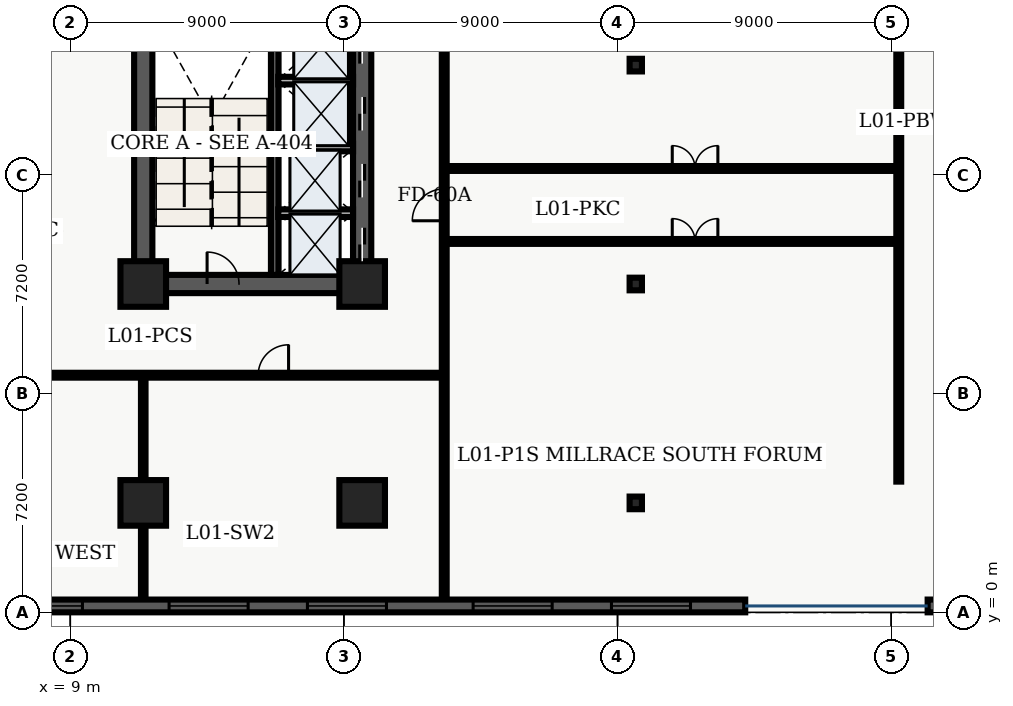
"""IFC4 building model, lengths in metres.
Left out: names, types, materials, properties, quantities, classifications, styles, units other than length and angle.
Written with IfcOpenShell. Run it as: python <this file> out.ifc"""

import sys

from ifc_helpers import new_model, entity, si_unit, converted_unit, direction, frame, origin_with_axes, origin_2d_with_axis, place, context, subcontext, project, spatial, polyline, rectangle, i_section, outline, extrude, element, fill, save


model = new_model("IFC4")
c1 = context("Model", 3, precision=1e-05, world=origin_with_axes(), true_north=direction((0.0, 1.0)))
c2 = subcontext(c1, "Body", "Model", "MODEL_VIEW")
j1 = project(units=[si_unit("LENGTHUNIT", "METRE"), converted_unit("PLANEANGLEUNIT", "DEGREE", entity("IfcPlaneAngleMeasure", 0.017), si_unit("PLANEANGLEUNIT", "RADIAN"), dimensions=[0, 0, 0, 0, 0, 0, 0])], contexts=[c1])
p1 = place(None, origin_with_axes())
s1 = spatial("IfcSite", under=j1, at=p1, CompositionType="ELEMENT")
p2 = place(p1, origin_with_axes())
s2 = spatial("IfcBuilding", under=s1, at=p2, CompositionType="ELEMENT")
p3 = place(p2, frame((0.0, 0.0, 5.7), z_axis=(0.0, 0.0, 1.0), x_axis=(1.0, 0.0, 0.0)))
s3 = spatial("IfcBuildingStorey", under=s2, at=p3, CompositionType="ELEMENT", Elevation=5.7)
p4 = place(p3, frame((11.4, 10.8, 0.0), z_axis=(0.0, 0.0, 1.0), x_axis=(0.0, 1.0, 0.0)))
e1 = element("IfcWall", 1, at=p4, inside=s3, PredefinedType="SHEAR", context=c2, shape_type="SweptSolid", body=[
    extrude(outline(polyline([(0.0, -0.3), (27.0, -0.3), (27.0, 0.3), (0.0, 0.3), (0.0, -0.3)])), origin_with_axes(), (0.0, 0.0, 1.0), 4.86),
])
p5 = place(p3, frame((11.4, 10.8, 0.0), z_axis=(0.0, 0.0, 1.0), x_axis=(1.0, 0.0, 0.0)))
e2 = element("IfcWall", 2, at=p5, inside=s3, PredefinedType="SHEAR", context=c2, shape_type="SweptSolid", body=[
    extrude(outline(polyline([(0.0, -0.3), (7.2, -0.3), (7.2, 0.3), (0.0, 0.3), (0.0, -0.3)])), origin_with_axes(), (0.0, 0.0, 1.0), 4.86),
])
p6 = place(p5, frame((2.625, 0.0, 0.0), z_axis=(0.0, 0.0, 1.0), x_axis=(1.0, 0.0, 0.0)))
e3 = element("IfcOpeningElement", 3, at=p6, cuts=e2, PredefinedType="OPENING", context=c2, shape_type="SweptSolid", body=[
    extrude(rectangle(XDim=1.05, YDim=0.62, at=origin_2d_with_axis()), origin_with_axes(), (0.0, 0.0, 1.0), 2.15),
])
p7 = place(p3, frame((18.6, 10.8, 0.0), z_axis=(0.0, 0.0, 1.0), x_axis=(0.0, 1.0, 0.0)))
e4 = element("IfcWall", 4, at=p7, inside=s3, PredefinedType="SHEAR", context=c2, shape_type="SweptSolid", body=[
    extrude(outline(polyline([(0.0, -0.3), (13.5, -0.3), (13.5, 0.3), (0.0, 0.3), (0.0, -0.3)])), origin_with_axes(), (0.0, 0.0, 1.0), 4.86),
])
p8 = place(p7, frame((1.3, 0.0, 0.0), z_axis=(0.0, 0.0, 1.0), x_axis=(1.0, 0.0, 0.0)))
e5 = element("IfcOpeningElement", 5, at=p8, cuts=e4, PredefinedType="OPENING", context=c2, shape_type="SweptSolid", body=[
    extrude(rectangle(XDim=1.1, YDim=0.62, at=origin_2d_with_axis()), origin_with_axes(), (0.0, 0.0, 1.0), 2.15),
])
p9 = place(p7, frame((3.4, 0.0, 0.0), z_axis=(0.0, 0.0, 1.0), x_axis=(1.0, 0.0, 0.0)))
e6 = element("IfcOpeningElement", 6, at=p9, cuts=e4, PredefinedType="OPENING", context=c2, shape_type="SweptSolid", body=[
    extrude(rectangle(XDim=1.1, YDim=0.62, at=origin_2d_with_axis()), origin_with_axes(), (0.0, 0.0, 1.0), 2.15),
])
p10 = place(p7, frame((5.6, 0.0, 0.0), z_axis=(0.0, 0.0, 1.0), x_axis=(1.0, 0.0, 0.0)))
e7 = element("IfcOpeningElement", 7, at=p10, cuts=e4, PredefinedType="OPENING", context=c2, shape_type="SweptSolid", body=[
    extrude(rectangle(XDim=1.1, YDim=0.62, at=origin_2d_with_axis()), origin_with_axes(), (0.0, 0.0, 1.0), 2.15),
])
p11 = place(p7, frame((7.8, 0.0, 0.0), z_axis=(0.0, 0.0, 1.0), x_axis=(1.0, 0.0, 0.0)))
e8 = element("IfcOpeningElement", 8, at=p11, cuts=e4, PredefinedType="OPENING", context=c2, shape_type="SweptSolid", body=[
    extrude(rectangle(XDim=1.1, YDim=0.62, at=origin_2d_with_axis()), origin_with_axes(), (0.0, 0.0, 1.0), 2.15),
])
p12 = place(p7, frame((11.125, 0.0, 0.0), z_axis=(0.0, 0.0, 1.0), x_axis=(1.0, 0.0, 0.0)))
e9 = element("IfcOpeningElement", 9, at=p12, cuts=e4, PredefinedType="OPENING", context=c2, shape_type="SweptSolid", body=[
    extrude(rectangle(XDim=1.05, YDim=0.62, at=origin_2d_with_axis()), origin_with_axes(), (0.0, 0.0, 1.0), 2.15),
])
p13 = place(p3, frame((15.725, 11.1, 0.0), z_axis=(0.0, 0.0, 1.0), x_axis=(0.0, 1.0, 0.0)))
e10 = element("IfcWall", 10, at=p13, inside=s3, PredefinedType="SHEAR", context=c2, shape_type="SweptSolid", body=[
    extrude(outline(polyline([(0.0, -0.125), (8.6, -0.125), (8.6, 0.125), (0.0, 0.125), (0.0, -0.125)])), origin_with_axes(), (0.0, 0.0, 1.0), 4.86),
])
for number, where, z_axis, x_axis in (
    (11, (11.4, 3.6, 0.0), (0.0, 0.0, 1.0), (1.0, 0.0, 0.0)),
    (12, (11.4, 10.8, 0.0), (0.0, 0.0, 1.0), (1.0, 0.0, 0.0)),
    (13, (18.6, 3.6, 0.0), (0.0, 0.0, 1.0), (1.0, 0.0, 0.0)),
    (14, (18.6, 10.8, 0.0), (0.0, 0.0, 1.0), (1.0, 0.0, 0.0)),
):
    element("IfcColumn", number, at=place(p3, frame(where, z_axis=z_axis, x_axis=x_axis)), inside=s3, PredefinedType="COLUMN", context=c2, shape_type="SweptSolid", body=[
        extrude(rectangle(XDim=1.5, YDim=1.5, at=origin_2d_with_axis()), origin_with_axes(), (0.0, 0.0, 1.0), 5.1),
    ])
for number, where, z_axis, x_axis in (
    (15, (27.6, 3.6, 0.0), (0.0, 0.0, 1.0), (1.0, 0.0, 0.0)),
    (16, (27.6, 10.8, 0.0), (0.0, 0.0, 1.0), (1.0, 0.0, 0.0)),
    (17, (27.6, 18.0, 0.0), (0.0, 0.0, 1.0), (1.0, 0.0, 0.0)),
):
    element("IfcColumn", number, at=place(p3, frame(where, z_axis=z_axis, x_axis=x_axis)), inside=s3, PredefinedType="COLUMN", context=c2, shape_type="SweptSolid", body=[
        extrude(i_section(OverallWidth=0.406, OverallDepth=0.416, WebThickness=0.03, FlangeThickness=0.048, FilletRadius=0.022, at=origin_2d_with_axis()), origin_with_axes(), (0.0, 0.0, 1.0), 5.1),
    ])
for number, where, z_axis, x_axis in (
    (18, (15.84, 13.13, 0.0), (0.0, 0.0, 1.0), (1.0, 0.0, 0.0)),
    (19, (15.84, 15.29, 0.0), (0.0, 0.0, 1.0), (1.0, 0.0, 0.0)),
    (20, (15.84, 17.49, 0.0), (0.0, 0.0, 1.0), (1.0, 0.0, 0.0)),
):
    element("IfcWall", number, at=place(p3, frame(where, z_axis=z_axis, x_axis=x_axis)), inside=s3, PredefinedType="SOLIDWALL", context=c2, shape_type="SweptSolid", body=[
        extrude(outline(polyline([(0.0, -0.125), (2.46, -0.125), (2.46, 0.125), (0.0, 0.125), (0.0, -0.125)])), origin_with_axes(), (0.0, 0.0, 1.0), 3.2),
    ])
p14 = place(p3, frame((0.38, 7.8, 0.0), z_axis=(0.0, 0.0, 1.0), x_axis=(1.0, 0.0, 0.0)))
e21 = element("IfcWall", 21, at=p14, inside=s3, PredefinedType="PARTITIONING", context=c2, shape_type="SweptSolid", body=[
    extrude(outline(polyline([(0.0, -0.08), (20.92, -0.08), (20.92, 0.08), (0.0, 0.08), (0.0, -0.08)])), origin_with_axes(), (0.0, 0.0, 1.0), 3.2),
])
p15 = place(p14, frame((3.7, 0.0, 0.0), z_axis=(0.0, 0.0, 1.0), x_axis=(1.0, 0.0, 0.0)))
e22 = element("IfcOpeningElement", 22, at=p15, cuts=e21, PredefinedType="OPENING", context=c2, shape_type="SweptSolid", body=[
    extrude(rectangle(XDim=1.0, YDim=0.18, at=origin_2d_with_axis()), origin_with_axes(), (0.0, 0.0, 1.0), 2.15),
])
p16 = place(p14, frame((15.3, 0.0, 0.0), z_axis=(0.0, 0.0, 1.0), x_axis=(1.0, 0.0, 0.0)))
e23 = element("IfcOpeningElement", 23, at=p16, cuts=e21, PredefinedType="OPENING", context=c2, shape_type="SweptSolid", body=[
    extrude(rectangle(XDim=1.0, YDim=0.18, at=origin_2d_with_axis()), origin_with_axes(), (0.0, 0.0, 1.0), 2.15),
])
p17 = place(p3, frame((11.4, 0.38, 0.0), z_axis=(0.0, 0.0, 1.0), x_axis=(0.0, 1.0, 0.0)))
e24 = element("IfcWall", 24, at=p17, inside=s3, PredefinedType="PARTITIONING", context=c2, shape_type="SweptSolid", body=[
    extrude(outline(polyline([(0.0, -0.075), (7.42, -0.075), (7.42, 0.075), (0.0, 0.075), (0.0, -0.075)])), origin_with_axes(), (0.0, 0.0, 1.0), 3.2),
])
p18 = place(p3, frame((21.3, 0.38, 0.0), z_axis=(0.0, 0.0, 1.0), x_axis=(0.0, 1.0, 0.0)))
e25 = element("IfcWall", 25, at=p18, inside=s3, PredefinedType="PARTITIONING", context=c2, shape_type="SweptSolid", body=[
    extrude(outline(polyline([(0.0, -0.08), (38.84, -0.08), (38.84, 0.08), (0.0, 0.08), (0.0, -0.08)])), origin_with_axes(), (0.0, 0.0, 1.0), 3.2),
])
p19 = place(p18, frame((13.025, 0.0, 0.0), z_axis=(0.0, 0.0, 1.0), x_axis=(1.0, 0.0, 0.0)))
e26 = element("IfcOpeningElement", 26, at=p19, cuts=e25, PredefinedType="OPENING", context=c2, shape_type="SweptSolid", body=[
    extrude(rectangle(XDim=1.05, YDim=0.18, at=origin_2d_with_axis()), origin_with_axes(), (0.0, 0.0, 1.0), 2.15),
])
p20 = place(p18, frame((31.25, 0.0, 0.0), z_axis=(0.0, 0.0, 1.0), x_axis=(1.0, 0.0, 0.0)))
e27 = element("IfcOpeningElement", 27, at=p20, cuts=e25, PredefinedType="OPENING", context=c2, shape_type="SweptSolid", body=[
    extrude(rectangle(XDim=1.5, YDim=0.18, at=origin_2d_with_axis()), origin_with_axes(), (0.0, 0.0, 1.0), 2.2),
])
p21 = place(p3, frame((21.3, 12.2, 0.0), z_axis=(0.0, 0.0, 1.0), x_axis=(1.0, 0.0, 0.0)))
e28 = element("IfcWall", 28, at=p21, inside=s3, PredefinedType="PARTITIONING", context=c2, shape_type="SweptSolid", body=[
    extrude(outline(polyline([(0.0, -0.08), (14.95, -0.08), (14.95, 0.08), (0.0, 0.08), (0.0, -0.08)])), origin_with_axes(), (0.0, 0.0, 1.0), 3.2),
])
p22 = place(p21, frame((8.25, 0.0, 0.0), z_axis=(0.0, 0.0, 1.0), x_axis=(1.0, 0.0, 0.0)))
e29 = element("IfcOpeningElement", 29, at=p22, cuts=e28, PredefinedType="OPENING", context=c2, shape_type="SweptSolid", body=[
    extrude(rectangle(XDim=1.5, YDim=0.18, at=origin_2d_with_axis()), origin_with_axes(), (0.0, 0.0, 1.0), 2.2),
])
p23 = place(p3, frame((21.3, 14.6, 0.0), z_axis=(0.0, 0.0, 1.0), x_axis=(1.0, 0.0, 0.0)))
e30 = element("IfcWall", 30, at=p23, inside=s3, PredefinedType="PARTITIONING", context=c2, shape_type="SweptSolid", body=[
    extrude(outline(polyline([(0.0, -0.08), (14.95, -0.08), (14.95, 0.08), (0.0, 0.08), (0.0, -0.08)])), origin_with_axes(), (0.0, 0.0, 1.0), 3.2),
])
p24 = place(p23, frame((8.25, 0.0, 0.0), z_axis=(0.0, 0.0, 1.0), x_axis=(1.0, 0.0, 0.0)))
e31 = element("IfcOpeningElement", 31, at=p24, cuts=e30, PredefinedType="OPENING", context=c2, shape_type="SweptSolid", body=[
    extrude(rectangle(XDim=1.5, YDim=0.18, at=origin_2d_with_axis()), origin_with_axes(), (0.0, 0.0, 1.0), 2.2),
])
p25 = place(p3, frame((36.25, 4.3, 0.0), z_axis=(0.0, 0.0, 1.0), x_axis=(0.0, 1.0, 0.0)))
e32 = element("IfcWall", 32, at=p25, inside=s3, PredefinedType="PARTITIONING", context=c2, shape_type="SweptSolid", body=[
    extrude(outline(polyline([(0.0, -0.08), (22.5, -0.08), (22.5, 0.08), (0.0, 0.08), (0.0, -0.08)])), origin_with_axes(), (0.0, 0.0, 1.0), 3.2),
])
p26 = place(p3, frame((67.98, 0.21, 0.0), z_axis=(0.0, 0.0, 1.0), x_axis=(-1.0, 0.0, 0.0)))
e33 = element("IfcWall", 33, at=p26, inside=s3, PredefinedType="SOLIDWALL", context=c2, shape_type="SweptSolid", body=[
    extrude(outline(polyline([(0.0, -0.21), (30.78, -0.21), (30.78, 0.21), (0.0, 0.21), (0.0, -0.21)])), origin_with_axes(), (0.0, 0.0, 1.0), 4.86),
])
p27 = place(p26, frame((3.065, 0.0, 0.45), z_axis=(0.0, 0.0, 1.0), x_axis=(1.0, 0.0, 0.0)))
e34 = element("IfcOpeningElement", 34, at=p27, cuts=e33, PredefinedType="OPENING", context=c2, shape_type="SweptSolid", body=[
    extrude(rectangle(XDim=2.6, YDim=0.44, at=origin_2d_with_axis()), origin_with_axes(), (0.0, 0.0, 1.0), 2.8),
])
p28 = place(p26, frame((7.995, 0.0, 0.45), z_axis=(0.0, 0.0, 1.0), x_axis=(1.0, 0.0, 0.0)))
e35 = element("IfcOpeningElement", 35, at=p28, cuts=e33, PredefinedType="OPENING", context=c2, shape_type="SweptSolid", body=[
    extrude(rectangle(XDim=2.6, YDim=0.44, at=origin_2d_with_axis()), origin_with_axes(), (0.0, 0.0, 1.0), 2.8),
])
p29 = place(p26, frame((12.925, 0.0, 0.45), z_axis=(0.0, 0.0, 1.0), x_axis=(1.0, 0.0, 0.0)))
e36 = element("IfcOpeningElement", 36, at=p29, cuts=e33, PredefinedType="OPENING", context=c2, shape_type="SweptSolid", body=[
    extrude(rectangle(XDim=2.6, YDim=0.44, at=origin_2d_with_axis()), origin_with_axes(), (0.0, 0.0, 1.0), 2.8),
])
p30 = place(p26, frame((22.785, 0.0, 0.45), z_axis=(0.0, 0.0, 1.0), x_axis=(1.0, 0.0, 0.0)))
e37 = element("IfcOpeningElement", 37, at=p30, cuts=e33, PredefinedType="OPENING", context=c2, shape_type="SweptSolid", body=[
    extrude(rectangle(XDim=2.6, YDim=0.44, at=origin_2d_with_axis()), origin_with_axes(), (0.0, 0.0, 1.0), 2.8),
])
p31 = place(p26, frame((27.715, 0.0, 0.45), z_axis=(0.0, 0.0, 1.0), x_axis=(1.0, 0.0, 0.0)))
e38 = element("IfcOpeningElement", 38, at=p31, cuts=e33, PredefinedType="OPENING", context=c2, shape_type="SweptSolid", body=[
    extrude(rectangle(XDim=2.6, YDim=0.44, at=origin_2d_with_axis()), origin_with_axes(), (0.0, 0.0, 1.0), 2.8),
])
p32 = place(p3, frame((31.2, 0.21, 0.0), z_axis=(0.0, 0.0, 1.0), x_axis=(-1.0, 0.0, 0.0)))
e39 = element("IfcWall", 39, at=p32, inside=s3, PredefinedType="SOLIDWALL", context=c2, shape_type="SweptSolid", body=[
    extrude(outline(polyline([(0.0, -0.21), (31.2, -0.21), (31.2, 0.21), (0.0, 0.21), (0.0, -0.21)])), origin_with_axes(), (0.0, 0.0, 1.0), 4.86),
])
p33 = place(p32, frame((3.1, 0.0, 0.45), z_axis=(0.0, 0.0, 1.0), x_axis=(1.0, 0.0, 0.0)))
e40 = element("IfcOpeningElement", 40, at=p33, cuts=e39, PredefinedType="OPENING", context=c2, shape_type="SweptSolid", body=[
    extrude(rectangle(XDim=2.6, YDim=0.44, at=origin_2d_with_axis()), origin_with_axes(), (0.0, 0.0, 1.0), 2.8),
])
p34 = place(p32, frame((7.65, 0.0, 0.45), z_axis=(0.0, 0.0, 1.0), x_axis=(1.0, 0.0, 0.0)))
e41 = element("IfcOpeningElement", 41, at=p34, cuts=e39, PredefinedType="OPENING", context=c2, shape_type="SweptSolid", body=[
    extrude(rectangle(XDim=2.6, YDim=0.44, at=origin_2d_with_axis()), origin_with_axes(), (0.0, 0.0, 1.0), 2.8),
])
p35 = place(p32, frame((13.1, 0.0, 0.45), z_axis=(0.0, 0.0, 1.0), x_axis=(1.0, 0.0, 0.0)))
e42 = element("IfcOpeningElement", 42, at=p35, cuts=e39, PredefinedType="OPENING", context=c2, shape_type="SweptSolid", body=[
    extrude(rectangle(XDim=2.6, YDim=0.44, at=origin_2d_with_axis()), origin_with_axes(), (0.0, 0.0, 1.0), 2.8),
])
p36 = place(p32, frame((17.65, 0.0, 0.45), z_axis=(0.0, 0.0, 1.0), x_axis=(1.0, 0.0, 0.0)))
e43 = element("IfcOpeningElement", 43, at=p36, cuts=e39, PredefinedType="OPENING", context=c2, shape_type="SweptSolid", body=[
    extrude(rectangle(XDim=2.6, YDim=0.44, at=origin_2d_with_axis()), origin_with_axes(), (0.0, 0.0, 1.0), 2.8),
])
p37 = place(p32, frame((23.1, 0.0, 0.45), z_axis=(0.0, 0.0, 1.0), x_axis=(1.0, 0.0, 0.0)))
e44 = element("IfcOpeningElement", 44, at=p37, cuts=e39, PredefinedType="OPENING", context=c2, shape_type="SweptSolid", body=[
    extrude(rectangle(XDim=2.6, YDim=0.44, at=origin_2d_with_axis()), origin_with_axes(), (0.0, 0.0, 1.0), 2.8),
])
p38 = place(p32, frame((28.1, 0.0, 0.45), z_axis=(0.0, 0.0, 1.0), x_axis=(1.0, 0.0, 0.0)))
e45 = element("IfcOpeningElement", 45, at=p38, cuts=e39, PredefinedType="OPENING", context=c2, shape_type="SweptSolid", body=[
    extrude(rectangle(XDim=2.6, YDim=0.44, at=origin_2d_with_axis()), origin_with_axes(), (0.0, 0.0, 1.0), 2.8),
])
p39 = place(p7, frame((1.3, 0.0, 0.0), z_axis=(0.0, 0.0, 1.0), x_axis=(1.0, 0.0, 0.0)))
e46 = element("IfcDoor", 46, at=p39, inside=s3, OperationType="SLIDING_TO_LEFT", PredefinedType="DOOR", context=c2, shape_type="SweptSolid", body=[
    extrude(rectangle(XDim=1.1, YDim=0.09, at=origin_2d_with_axis()), origin_with_axes(), (0.0, 0.0, 1.0), 2.15),
])
fill(e5, e46)
p40 = place(p7, frame((3.4, 0.0, 0.0), z_axis=(0.0, 0.0, 1.0), x_axis=(1.0, 0.0, 0.0)))
e47 = element("IfcDoor", 47, at=p40, inside=s3, OperationType="SLIDING_TO_RIGHT", PredefinedType="DOOR", context=c2, shape_type="SweptSolid", body=[
    extrude(rectangle(XDim=1.1, YDim=0.09, at=origin_2d_with_axis()), origin_with_axes(), (0.0, 0.0, 1.0), 2.15),
])
fill(e6, e47)
p41 = place(p7, frame((5.6, 0.0, 0.0), z_axis=(0.0, 0.0, 1.0), x_axis=(1.0, 0.0, 0.0)))
e48 = element("IfcDoor", 48, at=p41, inside=s3, OperationType="DOUBLE_DOOR_SLIDING", PredefinedType="DOOR", context=c2, shape_type="SweptSolid", body=[
    extrude(rectangle(XDim=1.1, YDim=0.09, at=origin_2d_with_axis()), origin_with_axes(), (0.0, 0.0, 1.0), 2.15),
])
fill(e7, e48)
p42 = place(p7, frame((7.8, 0.0, 0.0), z_axis=(0.0, 0.0, 1.0), x_axis=(1.0, 0.0, 0.0)))
e49 = element("IfcDoor", 49, at=p42, inside=s3, OperationType="DOUBLE_DOOR_SLIDING", PredefinedType="DOOR", context=c2, shape_type="SweptSolid", body=[
    extrude(rectangle(XDim=1.1, YDim=0.09, at=origin_2d_with_axis()), origin_with_axes(), (0.0, 0.0, 1.0), 2.15),
])
fill(e8, e49)
p43 = place(p5, frame((2.625, 0.0, 0.0), z_axis=(0.0, 0.0, 1.0), x_axis=(1.0, 0.0, 0.0)))
e50 = element("IfcDoor", 50, at=p43, inside=s3, OperationType="SINGLE_SWING_LEFT", PredefinedType="DOOR", context=c2, shape_type="SweptSolid", body=[
    extrude(rectangle(XDim=1.05, YDim=0.09, at=origin_2d_with_axis()), origin_with_axes(), (0.0, 0.0, 1.0), 2.15),
])
fill(e3, e50)
p44 = place(p18, frame((13.025, 0.0, 0.0), z_axis=(0.0, 0.0, 1.0), x_axis=(1.0, 0.0, 0.0)))
e51 = element("IfcDoor", 51, at=p44, inside=s3, OperationType="SINGLE_SWING_LEFT", PredefinedType="DOOR", context=c2, shape_type="SweptSolid", body=[
    extrude(rectangle(XDim=1.05, YDim=0.09, at=origin_2d_with_axis()), origin_with_axes(), (0.0, 0.0, 1.0), 2.15),
])
fill(e26, e51)
p45 = place(p14, frame((15.3, 0.0, 0.0), z_axis=(0.0, 0.0, 1.0), x_axis=(1.0, 0.0, 0.0)))
e52 = element("IfcDoor", 52, at=p45, inside=s3, OperationType="SINGLE_SWING_RIGHT", PredefinedType="DOOR", context=c2, shape_type="SweptSolid", body=[
    extrude(rectangle(XDim=1.0, YDim=0.09, at=origin_2d_with_axis()), origin_with_axes(), (0.0, 0.0, 1.0), 2.15),
])
fill(e23, e52)
p46 = place(p21, frame((8.25, 0.0, 0.0), z_axis=(0.0, 0.0, 1.0), x_axis=(1.0, 0.0, 0.0)))
e53 = element("IfcDoor", 53, at=p46, inside=s3, OperationType="DOUBLE_DOOR_SINGLE_SWING", PredefinedType="DOOR", context=c2, shape_type="SweptSolid", body=[
    extrude(rectangle(XDim=1.5, YDim=0.09, at=origin_2d_with_axis()), origin_with_axes(), (0.0, 0.0, 1.0), 2.2),
])
fill(e29, e53)
p47 = place(p23, frame((8.25, 0.0, 0.0), z_axis=(0.0, 0.0, 1.0), x_axis=(1.0, 0.0, 0.0)))
e54 = element("IfcDoor", 54, at=p47, inside=s3, OperationType="DOUBLE_DOOR_SINGLE_SWING", PredefinedType="DOOR", context=c2, shape_type="SweptSolid", body=[
    extrude(rectangle(XDim=1.5, YDim=0.09, at=origin_2d_with_axis()), origin_with_axes(), (0.0, 0.0, 1.0), 2.2),
])
fill(e31, e54)
p48 = place(p32, frame((3.1, 0.0, 0.45), z_axis=(0.0, 0.0, 1.0), x_axis=(1.0, 0.0, 0.0)))
e55 = element("IfcWindow", 55, at=p48, inside=s3, PredefinedType="WINDOW", context=c2, shape_type="SweptSolid", body=[
    extrude(rectangle(XDim=2.6, YDim=0.09, at=origin_2d_with_axis()), origin_with_axes(), (0.0, 0.0, 1.0), 2.8),
])
fill(e40, e55)
p49 = place(p32, frame((7.65, 0.0, 0.45), z_axis=(0.0, 0.0, 1.0), x_axis=(1.0, 0.0, 0.0)))
e56 = element("IfcWindow", 56, at=p49, inside=s3, PredefinedType="WINDOW", context=c2, shape_type="SweptSolid", body=[
    extrude(rectangle(XDim=2.6, YDim=0.09, at=origin_2d_with_axis()), origin_with_axes(), (0.0, 0.0, 1.0), 2.8),
])
fill(e41, e56)
p50 = place(p32, frame((13.1, 0.0, 0.45), z_axis=(0.0, 0.0, 1.0), x_axis=(1.0, 0.0, 0.0)))
e57 = element("IfcWindow", 57, at=p50, inside=s3, PredefinedType="WINDOW", context=c2, shape_type="SweptSolid", body=[
    extrude(rectangle(XDim=2.6, YDim=0.09, at=origin_2d_with_axis()), origin_with_axes(), (0.0, 0.0, 1.0), 2.8),
])
fill(e42, e57)
p51 = place(p32, frame((17.65, 0.0, 0.45), z_axis=(0.0, 0.0, 1.0), x_axis=(1.0, 0.0, 0.0)))
e58 = element("IfcWindow", 58, at=p51, inside=s3, PredefinedType="WINDOW", context=c2, shape_type="SweptSolid", body=[
    extrude(rectangle(XDim=2.6, YDim=0.09, at=origin_2d_with_axis()), origin_with_axes(), (0.0, 0.0, 1.0), 2.8),
])
fill(e43, e58)
p52 = place(p32, frame((23.1, 0.0, 0.45), z_axis=(0.0, 0.0, 1.0), x_axis=(1.0, 0.0, 0.0)))
e59 = element("IfcWindow", 59, at=p52, inside=s3, PredefinedType="WINDOW", context=c2, shape_type="SweptSolid", body=[
    extrude(rectangle(XDim=2.6, YDim=0.09, at=origin_2d_with_axis()), origin_with_axes(), (0.0, 0.0, 1.0), 2.8),
])
fill(e44, e59)
save(model, sys.argv[1])
